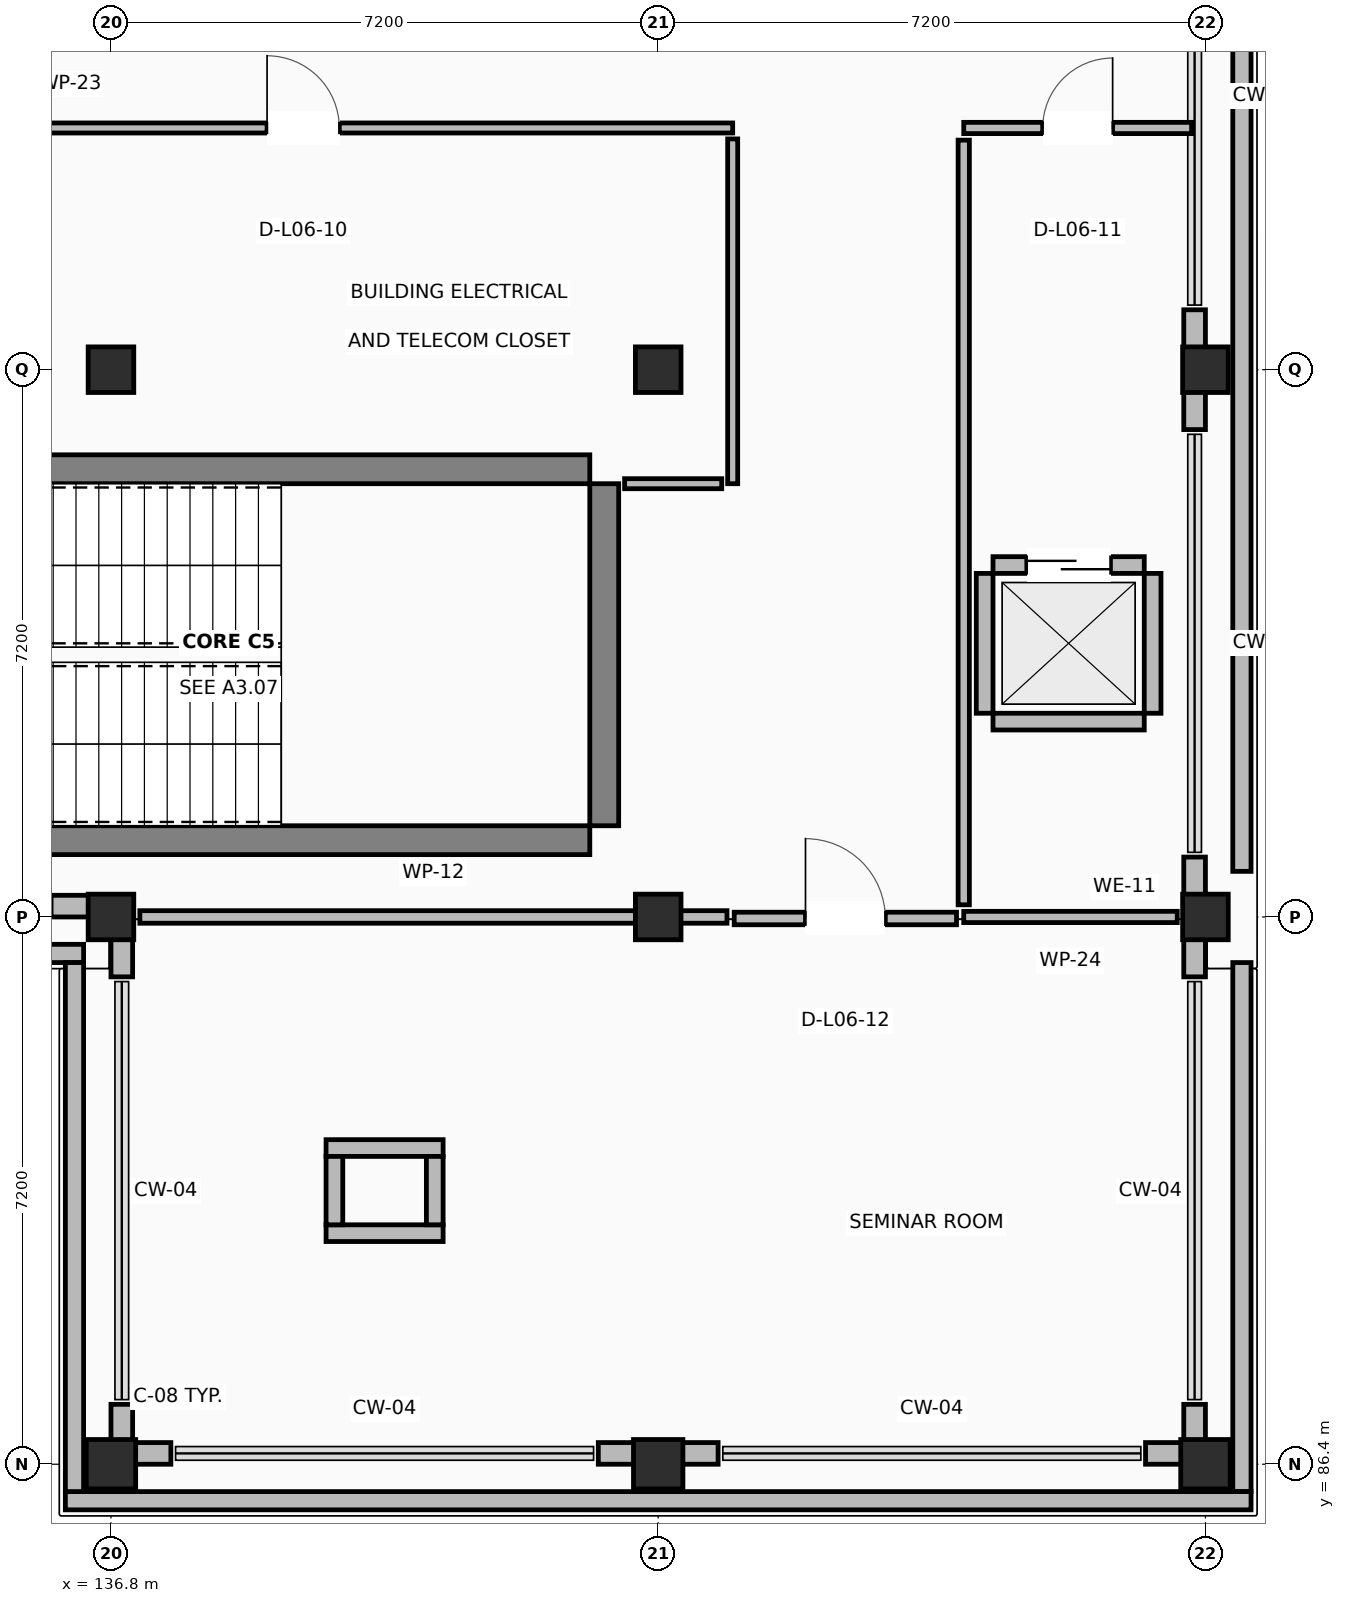
"""IFC4 building model, lengths in metres.
Left out: names, types, materials, properties, quantities, classifications, styles, units other than length and angle.
Written with IfcOpenShell. Run it as: python <this file> out.ifc"""

import sys

from ifc_helpers import new_model, si_unit, direction, frame, frame_2d, origin, origin_2d, place, context, subcontext, project, spatial, rectangle, extrude, element, fill, save


model = new_model("IFC4")
c1 = context("Model", 3, precision=1e-05, world=origin(), true_north=direction((0.0, 1.0)))
c2 = subcontext(c1, "Body", "Model", "MODEL_VIEW")
j1 = project(units=[si_unit("LENGTHUNIT", "METRE"), si_unit("PLANEANGLEUNIT", "RADIAN")], contexts=[c1])
p1 = place(None, origin())
s1 = spatial("IfcSite", under=j1, at=p1, CompositionType="ELEMENT")
p2 = place(p1, origin())
s2 = spatial("IfcBuilding", under=s1, at=p2, CompositionType="ELEMENT")
p3 = place(p2, frame((0.0, 0.0, 27.0)))
s3 = spatial("IfcBuildingStorey", under=s2, at=p3, CompositionType="ELEMENT", Elevation=27.0)
p4 = place(p3, frame((136.8, 86.4, 0.0), z_axis=(0.0, 0.0, 1.0), x_axis=(1.0, 0.0, 0.0)))
e1 = element("IfcColumn", 1, at=p4, inside=s3, PredefinedType="COLUMN", context=c2, shape_type="SweptSolid", body=[
    extrude(rectangle(XDim=0.65, YDim=0.65, at=origin_2d()), origin(), (0.0, 0.0, 1.0), 3.92),
])
for number, where, z_axis, x_axis in (
    (2, (136.8, 93.6, 0.0), (0.0, 0.0, 1.0), (1.0, 0.0, 0.0)),
    (3, (136.8, 100.8, 0.0), (0.0, 0.0, 1.0), (1.0, 0.0, 0.0)),
):
    element("IfcColumn", number, at=place(p3, frame(where, z_axis=z_axis, x_axis=x_axis)), inside=s3, PredefinedType="COLUMN", context=c2, shape_type="SweptSolid", body=[
        extrude(rectangle(XDim=0.6, YDim=0.6, at=origin_2d()), origin(), (0.0, 0.0, 1.0), 3.92),
    ])
p5 = place(p3, frame((144.0, 86.4, 0.0), z_axis=(0.0, 0.0, 1.0), x_axis=(1.0, 0.0, 0.0)))
e4 = element("IfcColumn", 4, at=p5, inside=s3, PredefinedType="COLUMN", context=c2, shape_type="SweptSolid", body=[
    extrude(rectangle(XDim=0.65, YDim=0.65, at=origin_2d()), origin(), (0.0, 0.0, 1.0), 3.92),
])
for number, where, z_axis, x_axis in (
    (5, (144.0, 93.6, 0.0), (0.0, 0.0, 1.0), (1.0, 0.0, 0.0)),
    (6, (144.0, 100.8, 0.0), (0.0, 0.0, 1.0), (1.0, 0.0, 0.0)),
):
    element("IfcColumn", number, at=place(p3, frame(where, z_axis=z_axis, x_axis=x_axis)), inside=s3, PredefinedType="COLUMN", context=c2, shape_type="SweptSolid", body=[
        extrude(rectangle(XDim=0.6, YDim=0.6, at=origin_2d()), origin(), (0.0, 0.0, 1.0), 3.92),
    ])
p6 = place(p3, frame((151.2, 86.4, 0.0), z_axis=(0.0, 0.0, 1.0), x_axis=(1.0, 0.0, 0.0)))
e7 = element("IfcColumn", 7, at=p6, inside=s3, PredefinedType="COLUMN", context=c2, shape_type="SweptSolid", body=[
    extrude(rectangle(XDim=0.65, YDim=0.65, at=origin_2d()), origin(), (0.0, 0.0, 1.0), 3.92),
])
for number, where, z_axis, x_axis in (
    (8, (151.2, 93.6, 0.0), (0.0, 0.0, 1.0), (1.0, 0.0, 0.0)),
    (9, (151.2, 100.8, 0.0), (0.0, 0.0, 1.0), (1.0, 0.0, 0.0)),
):
    element("IfcColumn", number, at=place(p3, frame(where, z_axis=z_axis, x_axis=x_axis)), inside=s3, PredefinedType="COLUMN", context=c2, shape_type="SweptSolid", body=[
        extrude(rectangle(XDim=0.6, YDim=0.6, at=origin_2d()), origin(), (0.0, 0.0, 1.0), 3.92),
    ])
for number, where, z_axis, x_axis in (
    (10, (133.6, 94.61, 0.0), (0.0, 0.0, 1.0), (1.0, 0.0, 0.0)),
    (11, (133.6, 99.49, 0.0), (0.0, 0.0, 1.0), (1.0, 0.0, 0.0)),
):
    element("IfcWall", number, at=place(p3, frame(where, z_axis=z_axis, x_axis=x_axis)), inside=s3, PredefinedType="SHEAR", context=c2, shape_type="SweptSolid", body=[
        extrude(rectangle(XDim=9.5, YDim=0.38, at=frame_2d((4.75, 0.0))), origin(), (0.0, 0.0, 1.0), 3.92),
    ])
p7 = place(p3, frame((143.29, 94.8, 0.0), z_axis=(0.0, 0.0, 1.0), x_axis=(0.0, 1.0, 0.0)))
e12 = element("IfcWall", 12, at=p7, inside=s3, PredefinedType="SHEAR", context=c2, shape_type="SweptSolid", body=[
    extrude(rectangle(XDim=4.5, YDim=0.38, at=frame_2d((2.25, 0.0))), origin(), (0.0, 0.0, 1.0), 3.92),
])
p8 = place(p3, frame((151.058, 93.6, 0.0), z_axis=(0.0, 0.0, 1.0), x_axis=(0.0, 1.0, 0.0)))
e13 = element("IfcWall", 13, at=p8, inside=s3, PredefinedType="STANDARD", context=c2, shape_type="SweptSolid", body=[
    extrude(rectangle(XDim=0.788, YDim=0.285, at=frame_2d((0.394, 0.0))), origin(), (0.0, 0.0, 1.0), 2.96),
])
p9 = place(p3, frame((151.058, 100.012, 0.0), z_axis=(0.0, 0.0, 1.0), x_axis=(0.0, 1.0, 0.0)))
e14 = element("IfcWall", 14, at=p9, inside=s3, PredefinedType="STANDARD", context=c2, shape_type="SweptSolid", body=[
    extrude(rectangle(XDim=1.576, YDim=0.285, at=frame_2d((0.788, 0.0))), origin(), (0.0, 0.0, 1.0), 2.96),
])
p10 = place(p3, frame((136.012, 93.742, 0.0), z_axis=(0.0, 0.0, 1.0), x_axis=(1.0, 0.0, 0.0)))
e15 = element("IfcWall", 15, at=p10, inside=s3, PredefinedType="STANDARD", context=c2, shape_type="SweptSolid", body=[
    extrude(rectangle(XDim=0.788, YDim=0.285, at=frame_2d((0.394, 0.0))), origin(), (0.0, 0.0, 1.0), 2.96),
])
p11 = place(p3, frame((136.942, 93.885, 0.0), z_axis=(0.0, 0.0, 1.0), x_axis=(0.0, -1.0, 0.0)))
e16 = element("IfcWall", 16, at=p11, inside=s3, PredefinedType="STANDARD", context=c2, shape_type="SweptSolid", body=[
    extrude(rectangle(XDim=1.073, YDim=0.285, at=frame_2d((0.537, 0.0))), origin(), (0.0, 0.0, 1.0), 2.96),
])
p12 = place(p3, frame((136.942, 87.188, 0.0), z_axis=(0.0, 0.0, 1.0), x_axis=(0.0, -1.0, 0.0)))
e17 = element("IfcWall", 17, at=p12, inside=s3, PredefinedType="STANDARD", context=c2, shape_type="SweptSolid", body=[
    extrude(rectangle(XDim=0.503, YDim=0.285, at=frame_2d((0.251, 0.0))), origin(), (0.0, 0.0, 1.0), 2.96),
])
p13 = place(p3, frame((136.8, 86.542, 0.0), z_axis=(0.0, 0.0, 1.0), x_axis=(1.0, 0.0, 0.0)))
e18 = element("IfcWall", 18, at=p13, inside=s3, PredefinedType="STANDARD", context=c2, shape_type="SweptSolid", body=[
    extrude(rectangle(XDim=0.788, YDim=0.285, at=frame_2d((0.394, 0.0))), origin(), (0.0, 0.0, 1.0), 2.96),
])
p14 = place(p3, frame((143.212, 86.542, 0.0), z_axis=(0.0, 0.0, 1.0), x_axis=(1.0, 0.0, 0.0)))
e19 = element("IfcWall", 19, at=p14, inside=s3, PredefinedType="STANDARD", context=c2, shape_type="SweptSolid", body=[
    extrude(rectangle(XDim=1.576, YDim=0.285, at=frame_2d((0.788, 0.0))), origin(), (0.0, 0.0, 1.0), 2.96),
])
p15 = place(p3, frame((150.412, 86.542, 0.0), z_axis=(0.0, 0.0, 1.0), x_axis=(1.0, 0.0, 0.0)))
e20 = element("IfcWall", 20, at=p15, inside=s3, PredefinedType="STANDARD", context=c2, shape_type="SweptSolid", body=[
    extrude(rectangle(XDim=0.788, YDim=0.285, at=frame_2d((0.394, 0.0))), origin(), (0.0, 0.0, 1.0), 2.96),
])
p16 = place(p3, frame((151.058, 86.685, 0.0), z_axis=(0.0, 0.0, 1.0), x_axis=(0.0, 1.0, 0.0)))
e21 = element("IfcWall", 21, at=p16, inside=s3, PredefinedType="STANDARD", context=c2, shape_type="SweptSolid", body=[
    extrude(rectangle(XDim=0.503, YDim=0.285, at=frame_2d((0.251, 0.0))), origin(), (0.0, 0.0, 1.0), 2.96),
])
p17 = place(p3, frame((151.058, 92.812, 0.0), z_axis=(0.0, 0.0, 1.0), x_axis=(0.0, 1.0, 0.0)))
e22 = element("IfcWall", 22, at=p17, inside=s3, PredefinedType="STANDARD", context=c2, shape_type="SweptSolid", body=[
    extrude(rectangle(XDim=0.788, YDim=0.285, at=frame_2d((0.394, 0.0))), origin(), (0.0, 0.0, 1.0), 2.96),
])
p18 = place(p3, frame((136.44, 93.12, 0.0), z_axis=(0.0, 0.0, 1.0), x_axis=(-1.0, 0.0, 0.0)))
e23 = element("IfcWall", 23, at=p18, inside=s3, PredefinedType="PARAPET", context=c2, shape_type="SweptSolid", body=[
    extrude(rectangle(XDim=57.84, YDim=0.24, at=frame_2d((28.92, 0.0))), origin(), (0.0, 0.0, 1.0), 1.12),
])
p19 = place(p3, frame((151.68, 115.56, 0.0), z_axis=(0.0, 0.0, 1.0), x_axis=(0.0, -1.0, 0.0)))
e24 = element("IfcWall", 24, at=p19, inside=s3, PredefinedType="PARAPET", context=c2, shape_type="SweptSolid", body=[
    extrude(rectangle(XDim=21.36, YDim=0.24, at=frame_2d((10.68, 0.0))), origin(), (0.0, 0.0, 1.0), 1.12),
])
p20 = place(p3, frame((151.68, 93.0, 0.0), z_axis=(0.0, 0.0, 1.0), x_axis=(0.0, -1.0, 0.0)))
e25 = element("IfcWall", 25, at=p20, inside=s3, PredefinedType="PARAPET", context=c2, shape_type="SweptSolid", body=[
    extrude(rectangle(XDim=6.96, YDim=0.24, at=frame_2d((3.48, 0.0))), origin(), (0.0, 0.0, 1.0), 1.12),
])
p21 = place(p3, frame((151.8, 85.92, 0.0), z_axis=(0.0, 0.0, 1.0), x_axis=(-1.0, 0.0, 0.0)))
e26 = element("IfcWall", 26, at=p21, inside=s3, PredefinedType="PARAPET", context=c2, shape_type="SweptSolid", body=[
    extrude(rectangle(XDim=15.6, YDim=0.24, at=frame_2d((7.8, 0.0))), origin(), (0.0, 0.0, 1.0), 1.12),
])
p22 = place(p3, frame((136.32, 86.04, 0.0), z_axis=(0.0, 0.0, 1.0), x_axis=(0.0, 1.0, 0.0)))
e27 = element("IfcWall", 27, at=p22, inside=s3, PredefinedType="PARAPET", context=c2, shape_type="SweptSolid", body=[
    extrude(rectangle(XDim=6.96, YDim=0.24, at=frame_2d((3.48, 0.0))), origin(), (0.0, 0.0, 1.0), 1.12),
])
p23 = place(p3, frame((148.405, 96.17, 0.0), z_axis=(0.0, 0.0, 1.0), x_axis=(1.0, 0.0, 0.0)))
e28 = element("IfcWall", 28, at=p23, inside=s3, PredefinedType="STANDARD", context=c2, shape_type="SweptSolid", body=[
    extrude(rectangle(XDim=1.99, YDim=0.22, at=frame_2d((0.995, 0.0))), origin(), (0.0, 0.0, 1.0), 2.96),
])
p24 = place(p3, frame((148.405, 98.23, 0.0), z_axis=(0.0, 0.0, 1.0), x_axis=(1.0, 0.0, 0.0)))
e29 = element("IfcWall", 29, at=p24, inside=s3, PredefinedType="STANDARD", context=c2, shape_type="SweptSolid", body=[
    extrude(rectangle(XDim=1.99, YDim=0.22, at=frame_2d((0.995, 0.0))), origin(), (0.0, 0.0, 1.0), 2.96),
])
p25 = place(p24, frame((0.445, 0.0, 0.0)))
e30 = element("IfcOpeningElement", 30, at=p25, cuts=e29, PredefinedType="OPENING", context=c2, shape_type="SweptSolid", body=[
    extrude(rectangle(XDim=1.1, YDim=2.15, at=frame_2d((0.55, 1.075))), frame((0.0, 0.12, 0.0), z_axis=(0.0, -1.0, 0.0), x_axis=(1.0, 0.0, 0.0)), (0.0, 0.0, 1.0), 0.24),
])
for number, where, z_axis, x_axis in (
    (31, (148.295, 96.28, 0.0), (0.0, 0.0, 1.0), (0.0, 1.0, 0.0)),
    (32, (150.505, 96.28, 0.0), (0.0, 0.0, 1.0), (0.0, 1.0, 0.0)),
):
    element("IfcWall", number, at=place(p3, frame(where, z_axis=z_axis, x_axis=x_axis)), inside=s3, PredefinedType="STANDARD", context=c2, shape_type="SweptSolid", body=[
        extrude(rectangle(XDim=1.84, YDim=0.22, at=frame_2d((0.92, 0.0))), origin(), (0.0, 0.0, 1.0), 2.96),
    ])
for number, where, z_axis, x_axis in (
    (33, (139.63, 89.44, 0.0), (0.0, 0.0, 1.0), (1.0, 0.0, 0.0)),
    (34, (139.63, 90.56, 0.0), (0.0, 0.0, 1.0), (1.0, 0.0, 0.0)),
):
    element("IfcWall", number, at=place(p3, frame(where, z_axis=z_axis, x_axis=x_axis)), inside=s3, PredefinedType="STANDARD", context=c2, shape_type="SweptSolid", body=[
        extrude(rectangle(XDim=1.54, YDim=0.22, at=frame_2d((0.77, 0.0))), origin(), (0.0, 0.0, 1.0), 2.96),
    ])
for number, where, z_axis, x_axis in (
    (35, (139.74, 89.55, 0.0), (0.0, 0.0, 1.0), (0.0, 1.0, 0.0)),
    (36, (141.06, 89.55, 0.0), (0.0, 0.0, 1.0), (0.0, 1.0, 0.0)),
):
    element("IfcWall", number, at=place(p3, frame(where, z_axis=z_axis, x_axis=x_axis)), inside=s3, PredefinedType="STANDARD", context=c2, shape_type="SweptSolid", body=[
        extrude(rectangle(XDim=0.9, YDim=0.22, at=frame_2d((0.45, 0.0))), origin(), (0.0, 0.0, 1.0), 2.96),
    ])
p26 = place(p3, frame((133.678, 103.98, 0.0), z_axis=(0.0, 0.0, 1.0), x_axis=(1.0, 0.0, 0.0)))
e37 = element("IfcWall", 37, at=p26, inside=s3, PredefinedType="PARTITIONING", context=c2, shape_type="SweptSolid", body=[
    extrude(rectangle(XDim=11.302, YDim=0.132, at=frame_2d((5.651, 0.0))), origin(), (0.0, 0.0, 1.0), 2.96),
])
p27 = place(p26, frame((5.176, 0.0, 0.0)))
e38 = element("IfcOpeningElement", 38, at=p27, cuts=e37, PredefinedType="OPENING", context=c2, shape_type="SweptSolid", body=[
    extrude(rectangle(XDim=0.95, YDim=2.1, at=frame_2d((0.475, 1.05))), frame((0.0, 0.076, 0.0), z_axis=(0.0, -1.0, 0.0), x_axis=(1.0, 0.0, 0.0)), (0.0, 0.0, 1.0), 0.152),
])
p28 = place(p3, frame((144.98, 103.836, 0.0), z_axis=(0.0, 0.0, 1.0), x_axis=(0.0, -1.0, 0.0)))
e39 = element("IfcWall", 39, at=p28, inside=s3, PredefinedType="PARTITIONING", context=c2, shape_type="SweptSolid", body=[
    extrude(rectangle(XDim=4.536, YDim=0.132, at=frame_2d((2.268, 0.0))), origin(), (0.0, 0.0, 1.0), 2.96),
])
p29 = place(p3, frame((144.836, 99.3, 0.0), z_axis=(0.0, 0.0, 1.0), x_axis=(-1.0, 0.0, 0.0)))
e40 = element("IfcWall", 40, at=p29, inside=s3, PredefinedType="PARTITIONING", context=c2, shape_type="SweptSolid", body=[
    extrude(rectangle(XDim=1.278, YDim=0.132, at=frame_2d((0.639, 0.0))), origin(), (0.0, 0.0, 1.0), 2.96),
])
p30 = place(p3, frame((148.02, 103.98, 0.0), z_axis=(0.0, 0.0, 1.0), x_axis=(1.0, 0.0, 0.0)))
e41 = element("IfcWall", 41, at=p30, inside=s3, PredefinedType="PARTITIONING", context=c2, shape_type="SweptSolid", body=[
    extrude(rectangle(XDim=2.998, YDim=0.148, at=frame_2d((1.499, 0.0))), origin(), (0.0, 0.0, 1.0), 2.96),
])
p31 = place(p30, frame((1.039, 0.0, 0.0)))
e42 = element("IfcOpeningElement", 42, at=p31, cuts=e41, PredefinedType="OPENING", context=c2, shape_type="SweptSolid", body=[
    extrude(rectangle(XDim=0.92, YDim=2.1, at=frame_2d((0.46, 1.05))), frame((0.0, 0.084, 0.0), z_axis=(0.0, -1.0, 0.0), x_axis=(1.0, 0.0, 0.0)), (0.0, 0.0, 1.0), 0.168),
])
p32 = place(p3, frame((150.829, 93.6, 0.0), z_axis=(0.0, 0.0, 1.0), x_axis=(-1.0, 0.0, 0.0)))
e43 = element("IfcWall", 43, at=p32, inside=s3, PredefinedType="PARTITIONING", context=c2, shape_type="SweptSolid", body=[
    extrude(rectangle(XDim=2.809, YDim=0.148, at=frame_2d((1.405, 0.0))), origin(), (0.0, 0.0, 1.0), 2.96),
])
p33 = place(p3, frame((148.02, 93.76, 0.0), z_axis=(0.0, 0.0, 1.0), x_axis=(0.0, 1.0, 0.0)))
e44 = element("IfcWall", 44, at=p33, inside=s3, PredefinedType="PARTITIONING", context=c2, shape_type="SweptSolid", body=[
    extrude(rectangle(XDim=10.06, YDim=0.148, at=frame_2d((5.03, 0.0))), origin(), (0.0, 0.0, 1.0), 2.96),
])
p34 = place(p3, frame((145.0, 93.58, 0.0), z_axis=(0.0, 0.0, 1.0), x_axis=(1.0, 0.0, 0.0)))
e45 = element("IfcWall", 45, at=p34, inside=s3, PredefinedType="PARTITIONING", context=c2, shape_type="SweptSolid", body=[
    extrude(rectangle(XDim=2.925, YDim=0.165, at=frame_2d((1.462, 0.0))), origin(), (0.0, 0.0, 1.0), 2.96),
])
p35 = place(p34, frame((0.938, 0.0, 0.0)))
e46 = element("IfcOpeningElement", 46, at=p35, cuts=e45, PredefinedType="OPENING", context=c2, shape_type="SweptSolid", body=[
    extrude(rectangle(XDim=1.05, YDim=2.15, at=frame_2d((0.525, 1.075))), frame((0.0, 0.093, 0.0), z_axis=(0.0, -1.0, 0.0), x_axis=(1.0, 0.0, 0.0)), (0.0, 0.0, 1.0), 0.185),
])
p36 = place(p3, frame((137.18, 93.6, 0.0), z_axis=(0.0, 0.0, 1.0), x_axis=(1.0, 0.0, 0.0)))
e47 = element("IfcWall", 47, at=p36, inside=s3, PredefinedType="PARTITIONING", context=c2, shape_type="SweptSolid", body=[
    extrude(rectangle(XDim=7.725, YDim=0.165, at=frame_2d((3.863, 0.0))), origin(), (0.0, 0.0, 1.0), 2.96),
])
p37 = place(p25, origin())
e48 = element("IfcDoor", 48, at=p37, inside=s3, OperationType="SLIDING_TO_LEFT", PredefinedType="DOOR", context=c2, shape_type="SweptSolid", body=[
    extrude(rectangle(XDim=1.1, YDim=2.15, at=frame_2d((0.55, 1.075))), frame((0.0, 0.025, 0.0), z_axis=(0.0, -1.0, 0.0), x_axis=(1.0, 0.0, 0.0)), (0.0, 0.0, 1.0), 0.05),
])
fill(e30, e48)
p38 = place(p27, origin())
e49 = element("IfcDoor", 49, at=p38, inside=s3, OperationType="SINGLE_SWING_LEFT", PredefinedType="DOOR", context=c2, shape_type="SweptSolid", body=[
    extrude(rectangle(XDim=0.95, YDim=2.1, at=frame_2d((0.475, 1.05))), frame((0.0, 0.025, 0.0), z_axis=(0.0, -1.0, 0.0), x_axis=(1.0, 0.0, 0.0)), (0.0, 0.0, 1.0), 0.05),
])
fill(e38, e49)
p39 = place(p31, origin())
e50 = element("IfcDoor", 50, at=p39, inside=s3, OperationType="SINGLE_SWING_RIGHT", PredefinedType="DOOR", context=c2, shape_type="SweptSolid", body=[
    extrude(rectangle(XDim=0.92, YDim=2.1, at=frame_2d((0.46, 1.05))), frame((0.0, 0.025, 0.0), z_axis=(0.0, -1.0, 0.0), x_axis=(1.0, 0.0, 0.0)), (0.0, 0.0, 1.0), 0.05),
])
fill(e42, e50)
p40 = place(p35, origin())
e51 = element("IfcDoor", 51, at=p40, inside=s3, OperationType="SINGLE_SWING_LEFT", PredefinedType="DOOR", context=c2, shape_type="SweptSolid", body=[
    extrude(rectangle(XDim=1.05, YDim=2.15, at=frame_2d((0.525, 1.075))), frame((0.0, 0.025, 0.0), z_axis=(0.0, -1.0, 0.0), x_axis=(1.0, 0.0, 0.0)), (0.0, 0.0, 1.0), 0.05),
])
fill(e46, e51)
save(model, sys.argv[1])
